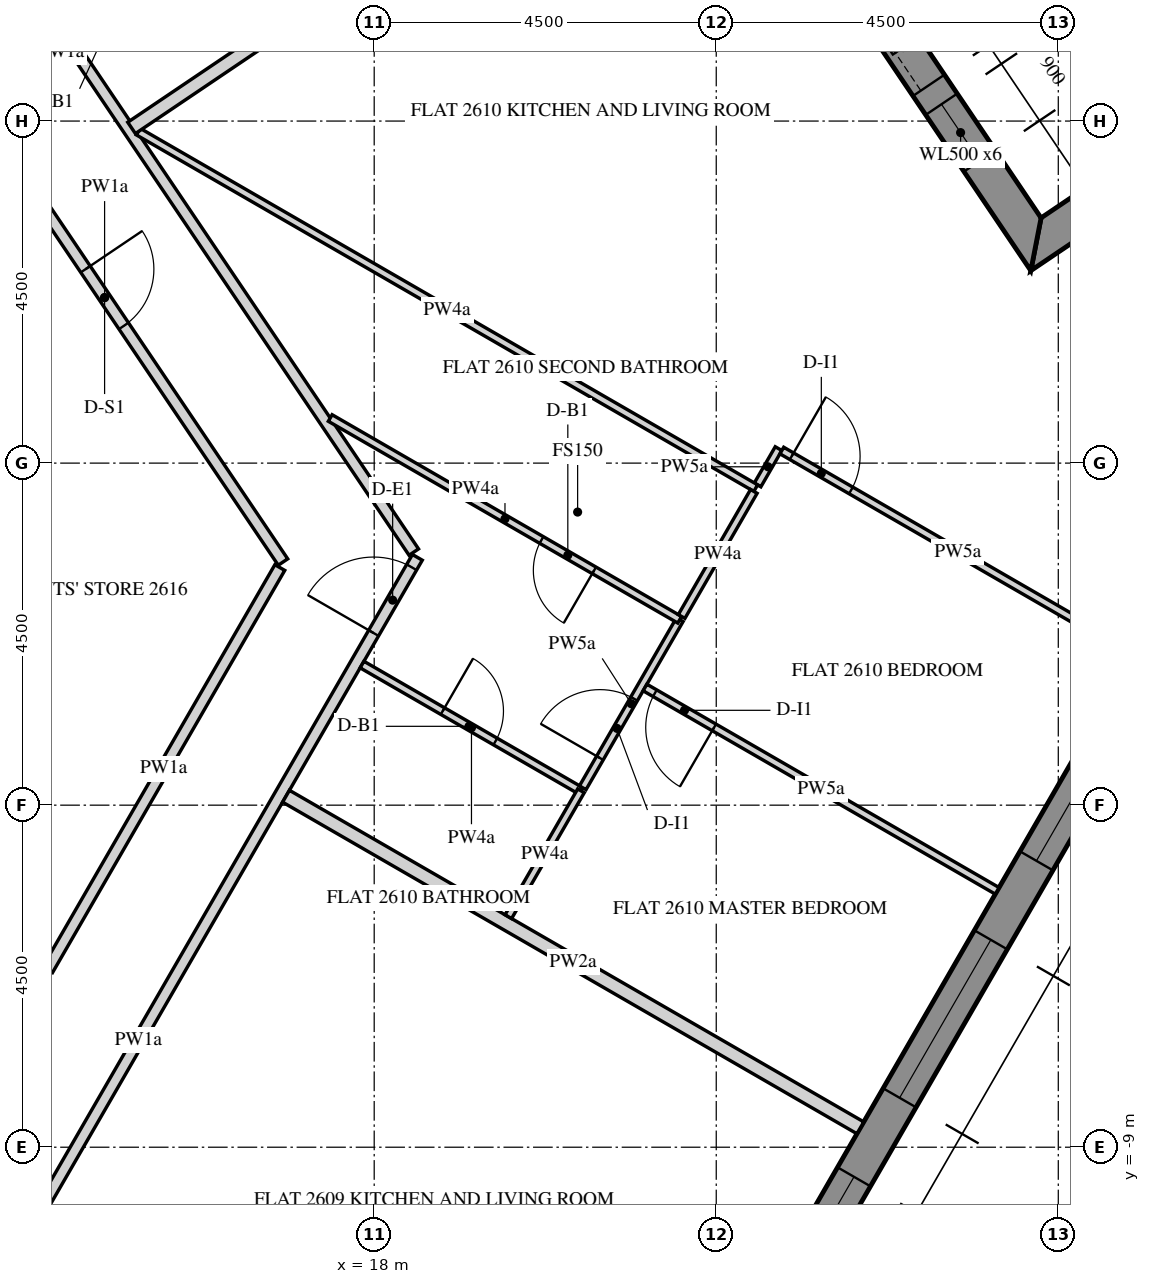
"""IFC4 building model, lengths in metres.
Left out: names, types, materials, properties, quantities, classifications, styles, units other than length and angle.
Written with IfcOpenShell. Run it as: python <this file> out.ifc"""

import sys

from ifc_helpers import new_model, si_unit, direction, frame, frame_2d, origin, place, context, subcontext, project, spatial, polyline, rectangle, outline, extrude, element, fill, save


model = new_model("IFC4")
c1 = context("Model", 3, precision=1e-05, world=origin(), true_north=direction((0.0, 1.0)))
c2 = subcontext(c1, "Body", "Model", "MODEL_VIEW")
j1 = project(units=[si_unit("LENGTHUNIT", "METRE"), si_unit("PLANEANGLEUNIT", "RADIAN")], contexts=[c1])
p1 = place(None, origin())
s1 = spatial("IfcSite", under=j1, at=p1, CompositionType="ELEMENT")
p2 = place(p1, origin())
s2 = spatial("IfcBuilding", under=s1, at=p2, CompositionType="ELEMENT")
p3 = place(p2, frame((0.0, 0.0, 334.2)))
s3 = spatial("IfcBuildingStorey", under=s2, at=p3, CompositionType="ELEMENT", Elevation=334.2)
p4 = place(p3, frame((16.451, -23.005, -0.15), z_axis=(0.0, 0.0, 1.0), x_axis=(0.500003737743, 0.866023245787, 0.0)))
e1 = element("IfcWall", 1, at=p4, inside=s3, PredefinedType="SOLIDWALL", context=c2, shape_type="SweptSolid", body=[
    extrude(outline(polyline([(-0.021, -0.25), (25.468, -0.25), (25.421, 0.25), (0.021, 0.25), (-0.021, -0.25)])), origin(), (0.0, 0.0, 1.0), 3.75),
])
p5 = place(p4, frame((2.522, 0.0, 0.75)))
e2 = element("IfcOpeningElement", 2, at=p5, cuts=e1, PredefinedType="OPENING", context=c2, shape_type="SweptSolid", body=[
    extrude(rectangle(XDim=2.4, YDim=2.7, at=frame_2d((1.2, 1.35))), frame((0.0, 0.26, 0.0), z_axis=(0.0, -1.0, 0.0), x_axis=(1.0, 0.0, 0.0)), (0.0, 0.0, 1.0), 0.52),
])
p6 = place(p4, frame((6.122, 0.0, 0.75)))
e3 = element("IfcOpeningElement", 3, at=p6, cuts=e1, PredefinedType="OPENING", context=c2, shape_type="SweptSolid", body=[
    extrude(rectangle(XDim=2.4, YDim=2.7, at=frame_2d((1.2, 1.35))), frame((0.0, 0.26, 0.0), z_axis=(0.0, -1.0, 0.0), x_axis=(1.0, 0.0, 0.0)), (0.0, 0.0, 1.0), 0.52),
])
p7 = place(p4, frame((9.722, 0.0, 0.75)))
e4 = element("IfcOpeningElement", 4, at=p7, cuts=e1, PredefinedType="OPENING", context=c2, shape_type="SweptSolid", body=[
    extrude(rectangle(XDim=2.4, YDim=2.7, at=frame_2d((1.2, 1.35))), frame((0.0, 0.26, 0.0), z_axis=(0.0, -1.0, 0.0), x_axis=(1.0, 0.0, 0.0)), (0.0, 0.0, 1.0), 0.52),
])
p8 = place(p4, frame((13.323, 0.0, 0.75)))
e5 = element("IfcOpeningElement", 5, at=p8, cuts=e1, PredefinedType="OPENING", context=c2, shape_type="SweptSolid", body=[
    extrude(rectangle(XDim=2.4, YDim=2.7, at=frame_2d((1.2, 1.35))), frame((0.0, 0.26, 0.0), z_axis=(0.0, -1.0, 0.0), x_axis=(1.0, 0.0, 0.0)), (0.0, 0.0, 1.0), 0.52),
])
p9 = place(p4, frame((16.922, 0.0, 0.75)))
e6 = element("IfcOpeningElement", 6, at=p9, cuts=e1, PredefinedType="OPENING", context=c2, shape_type="SweptSolid", body=[
    extrude(rectangle(XDim=2.4, YDim=2.7, at=frame_2d((1.2, 1.35))), frame((0.0, 0.26, 0.0), z_axis=(0.0, -1.0, 0.0), x_axis=(1.0, 0.0, 0.0)), (0.0, 0.0, 1.0), 0.52),
])
p10 = place(p4, frame((20.522, 0.0, 0.75)))
e7 = element("IfcOpeningElement", 7, at=p10, cuts=e1, PredefinedType="OPENING", context=c2, shape_type="SweptSolid", body=[
    extrude(rectangle(XDim=2.4, YDim=2.7, at=frame_2d((1.2, 1.35))), frame((0.0, 0.26, 0.0), z_axis=(0.0, -1.0, 0.0), x_axis=(1.0, 0.0, 0.0)), (0.0, 0.0, 1.0), 0.52),
])
p11 = place(p3, frame((28.364, 3.997, -0.15), z_axis=(0.0, 0.0, 1.0), x_axis=(-0.829108975345, -0.5590870299, 0.0)))
e8 = element("IfcWall", 8, at=p11, inside=s3, PredefinedType="SOLIDWALL", context=c2, shape_type="SweptSolid", body=[
    extrude(outline(polyline([(-0.25, -0.25), (1.75, -0.25), (2.25, 0.25), (0.25, 0.25), (-0.25, -0.25)])), origin(), (0.0, 0.0, 1.0), 3.75),
])
p12 = place(p3, frame((26.706, 2.879, -0.15), z_axis=(0.0, 0.0, 1.0), x_axis=(-0.559197891507, 0.829034208061, 0.0)))
e9 = element("IfcWall", 9, at=p12, inside=s3, PredefinedType="SOLIDWALL", context=c2, shape_type="SweptSolid", body=[
    extrude(outline(polyline([(0.25, -0.25), (22.795, -0.25), (23.295, 0.25), (-0.25, 0.25), (0.25, -0.25)])), origin(), (0.0, 0.0, 1.0), 3.75),
])
p13 = place(p12, frame((1.323, 0.0, 1.05)))
e10 = element("IfcOpeningElement", 10, at=p13, cuts=e9, PredefinedType="OPENING", context=c2, shape_type="SweptSolid", body=[
    extrude(rectangle(XDim=0.9, YDim=1.5, at=frame_2d((0.45, 0.75))), frame((0.0, 0.26, 0.0), z_axis=(0.0, -1.0, 0.0), x_axis=(1.0, 0.0, 0.0)), (0.0, 0.0, 1.0), 0.52),
])
p14 = place(p12, frame((2.522, 0.0, 0.15)))
e11 = element("IfcOpeningElement", 11, at=p14, cuts=e9, PredefinedType="OPENING", context=c2, shape_type="SweptSolid", body=[
    extrude(rectangle(XDim=1.2, YDim=2.4, at=frame_2d((0.6, 1.2))), frame((0.0, 0.26, 0.0), z_axis=(0.0, -1.0, 0.0), x_axis=(1.0, 0.0, 0.0)), (0.0, 0.0, 1.0), 0.52),
])
p15 = place(p12, frame((4.922, 0.0, 1.05)))
e12 = element("IfcOpeningElement", 12, at=p15, cuts=e9, PredefinedType="OPENING", context=c2, shape_type="SweptSolid", body=[
    extrude(rectangle(XDim=0.9, YDim=1.5, at=frame_2d((0.45, 0.75))), frame((0.0, 0.26, 0.0), z_axis=(0.0, -1.0, 0.0), x_axis=(1.0, 0.0, 0.0)), (0.0, 0.0, 1.0), 0.52),
])
p16 = place(p12, frame((6.122, 0.0, 0.15)))
e13 = element("IfcOpeningElement", 13, at=p16, cuts=e9, PredefinedType="OPENING", context=c2, shape_type="SweptSolid", body=[
    extrude(rectangle(XDim=1.2, YDim=2.4, at=frame_2d((0.6, 1.2))), frame((0.0, 0.26, 0.0), z_axis=(0.0, -1.0, 0.0), x_axis=(1.0, 0.0, 0.0)), (0.0, 0.0, 1.0), 0.52),
])
p17 = place(p12, frame((8.522, 0.0, 1.05)))
e14 = element("IfcOpeningElement", 14, at=p17, cuts=e9, PredefinedType="OPENING", context=c2, shape_type="SweptSolid", body=[
    extrude(rectangle(XDim=0.9, YDim=1.5, at=frame_2d((0.45, 0.75))), frame((0.0, 0.26, 0.0), z_axis=(0.0, -1.0, 0.0), x_axis=(1.0, 0.0, 0.0)), (0.0, 0.0, 1.0), 0.52),
])
p18 = place(p12, frame((9.722, 0.0, 0.15)))
e15 = element("IfcOpeningElement", 15, at=p18, cuts=e9, PredefinedType="OPENING", context=c2, shape_type="SweptSolid", body=[
    extrude(rectangle(XDim=1.2, YDim=2.4, at=frame_2d((0.6, 1.2))), frame((0.0, 0.26, 0.0), z_axis=(0.0, -1.0, 0.0), x_axis=(1.0, 0.0, 0.0)), (0.0, 0.0, 1.0), 0.52),
])
p19 = place(p12, frame((12.122, 0.0, 1.05)))
e16 = element("IfcOpeningElement", 16, at=p19, cuts=e9, PredefinedType="OPENING", context=c2, shape_type="SweptSolid", body=[
    extrude(rectangle(XDim=0.9, YDim=1.5, at=frame_2d((0.45, 0.75))), frame((0.0, 0.26, 0.0), z_axis=(0.0, -1.0, 0.0), x_axis=(1.0, 0.0, 0.0)), (0.0, 0.0, 1.0), 0.52),
])
p20 = place(p12, frame((13.323, 0.0, 0.15)))
e17 = element("IfcOpeningElement", 17, at=p20, cuts=e9, PredefinedType="OPENING", context=c2, shape_type="SweptSolid", body=[
    extrude(rectangle(XDim=1.2, YDim=2.4, at=frame_2d((0.6, 1.2))), frame((0.0, 0.26, 0.0), z_axis=(0.0, -1.0, 0.0), x_axis=(1.0, 0.0, 0.0)), (0.0, 0.0, 1.0), 0.52),
])
p21 = place(p12, frame((15.722, 0.0, 1.05)))
e18 = element("IfcOpeningElement", 18, at=p21, cuts=e9, PredefinedType="OPENING", context=c2, shape_type="SweptSolid", body=[
    extrude(rectangle(XDim=0.9, YDim=1.5, at=frame_2d((0.45, 0.75))), frame((0.0, 0.26, 0.0), z_axis=(0.0, -1.0, 0.0), x_axis=(1.0, 0.0, 0.0)), (0.0, 0.0, 1.0), 0.52),
])
p22 = place(p12, frame((16.922, 0.0, 0.15)))
e19 = element("IfcOpeningElement", 19, at=p22, cuts=e9, PredefinedType="OPENING", context=c2, shape_type="SweptSolid", body=[
    extrude(rectangle(XDim=1.2, YDim=2.4, at=frame_2d((0.6, 1.2))), frame((0.0, 0.26, 0.0), z_axis=(0.0, -1.0, 0.0), x_axis=(1.0, 0.0, 0.0)), (0.0, 0.0, 1.0), 0.52),
])
p23 = place(p12, frame((19.323, 0.0, 1.05)))
e20 = element("IfcOpeningElement", 20, at=p23, cuts=e9, PredefinedType="OPENING", context=c2, shape_type="SweptSolid", body=[
    extrude(rectangle(XDim=0.9, YDim=1.5, at=frame_2d((0.45, 0.75))), frame((0.0, 0.26, 0.0), z_axis=(0.0, -1.0, 0.0), x_axis=(1.0, 0.0, 0.0)), (0.0, 0.0, 1.0), 0.52),
])
p24 = place(p12, frame((20.522, 0.0, 0.15)))
e21 = element("IfcOpeningElement", 21, at=p24, cuts=e9, PredefinedType="OPENING", context=c2, shape_type="SweptSolid", body=[
    extrude(rectangle(XDim=1.2, YDim=2.4, at=frame_2d((0.6, 1.2))), frame((0.0, 0.26, 0.0), z_axis=(0.0, -1.0, 0.0), x_axis=(1.0, 0.0, 0.0)), (0.0, 0.0, 1.0), 0.52),
])
p25 = place(p3, frame((11.229, -13.951, 0.0), z_axis=(0.0, 0.0, 1.0), x_axis=(0.499997948852, 0.866026588012, 0.0)))
e22 = element("IfcWall", 22, at=p25, inside=s3, PredefinedType="PARTITIONING", context=c2, shape_type="SweptSolid", body=[
    extrude(rectangle(XDim=14.677, YDim=0.15, at=frame_2d((7.339, 0.0))), origin(), (0.0, 0.0, 1.0), 2.838),
])
p26 = place(p25, frame((0.4, 0.0, 0.0)))
e23 = element("IfcOpeningElement", 23, at=p26, cuts=e22, PredefinedType="OPENING", context=c2, shape_type="SweptSolid", body=[
    extrude(rectangle(XDim=1.0, YDim=2.1, at=frame_2d((0.5, 1.05))), frame((0.0, 0.085, 0.0), z_axis=(0.0, -1.0, 0.0), x_axis=(1.0, 0.0, 0.0)), (0.0, 0.0, 1.0), 0.17),
])
p27 = place(p25, frame((13.527, 0.0, 0.0)))
e24 = element("IfcOpeningElement", 24, at=p27, cuts=e22, PredefinedType="OPENING", context=c2, shape_type="SweptSolid", body=[
    extrude(rectangle(XDim=1.0, YDim=2.1, at=frame_2d((0.5, 1.05))), frame((0.0, 0.085, 0.0), z_axis=(0.0, -1.0, 0.0), x_axis=(1.0, 0.0, 0.0)), (0.0, 0.0, 1.0), 0.17),
])
p28 = place(p3, frame((18.521, -1.171, 0.0), z_axis=(0.0, 0.0, 1.0), x_axis=(-0.559191021435, 0.829038842001, 0.0)))
e25 = element("IfcWall", 25, at=p28, inside=s3, PredefinedType="PARTITIONING", context=c2, shape_type="SweptSolid", body=[
    extrude(rectangle(XDim=16.605, YDim=0.15, at=frame_2d((8.303, 0.0))), origin(), (0.0, 0.0, 1.0), 2.838),
])
p29 = place(p28, frame((9.703, 0.0, 0.0)))
e26 = element("IfcOpeningElement", 26, at=p29, cuts=e25, PredefinedType="OPENING", context=c2, shape_type="SweptSolid", body=[
    extrude(rectangle(XDim=1.0, YDim=2.1, at=frame_2d((0.5, 1.05))), frame((0.0, 0.085, 0.0), z_axis=(0.0, -1.0, 0.0), x_axis=(1.0, 0.0, 0.0)), (0.0, 0.0, 1.0), 0.17),
])
p30 = place(p3, frame((12.106, 5.657, 0.0), z_axis=(0.0, 0.0, 1.0), x_axis=(0.559202573837, -0.829031049728, 0.0)))
e27 = element("IfcWall", 27, at=p30, inside=s3, PredefinedType="PARTITIONING", context=c2, shape_type="SweptSolid", body=[
    extrude(rectangle(XDim=8.394, YDim=0.15, at=frame_2d((4.197, 0.0))), origin(), (0.0, 0.0, 1.0), 2.838),
])
p31 = place(p30, frame((3.747, 0.0, 0.0)))
e28 = element("IfcOpeningElement", 28, at=p31, cuts=e27, PredefinedType="OPENING", context=c2, shape_type="SweptSolid", body=[
    extrude(rectangle(XDim=0.9, YDim=2.1, at=frame_2d((0.45, 1.05))), frame((0.0, 0.085, 0.0), z_axis=(0.0, -1.0, 0.0), x_axis=(1.0, 0.0, 0.0)), (0.0, 0.0, 1.0), 0.17),
])
p32 = place(p3, frame((16.758, -1.374, 0.0), z_axis=(0.0, 0.0, 1.0), x_axis=(-0.499980689202, -0.866036552592, 0.0)))
e29 = element("IfcWall", 29, at=p32, inside=s3, PredefinedType="PARTITIONING", context=c2, shape_type="SweptSolid", body=[
    extrude(rectangle(XDim=6.111, YDim=0.15, at=frame_2d((3.055, 0.0))), origin(), (0.0, 0.0, 1.0), 2.838),
])
p33 = place(p3, frame((24.396, -8.745, 0.0), z_axis=(0.0, 0.0, 1.0), x_axis=(-0.866018297078, 0.500012308975, 0.0)))
e30 = element("IfcWall", 30, at=p33, inside=s3, PredefinedType="PARTITIONING", context=c2, shape_type="SweptSolid", body=[
    extrude(rectangle(XDim=8.725, YDim=0.18, at=frame_2d((4.362, 0.0))), origin(), (0.0, 0.0, 1.0), 2.838),
])
p34 = place(p3, frame((23.043, -0.287, 0.0), z_axis=(0.0, 0.0, 1.0), x_axis=(0.500181810019, 0.865920410272, 0.0)))
e31 = element("IfcWall", 31, at=p34, inside=s3, PredefinedType="PARTITIONING", context=c2, shape_type="SweptSolid", body=[
    extrude(rectangle(XDim=0.552, YDim=0.1, at=frame_2d((0.276, 0.0))), origin(), (0.0, 0.0, 1.0), 2.838),
])
p35 = place(p3, frame((23.363, 0.166, 0.0), z_axis=(0.0, 0.0, 1.0), x_axis=(0.866024483152, -0.500001594578, 0.0)))
e32 = element("IfcWall", 32, at=p35, inside=s3, PredefinedType="PARTITIONING", context=c2, shape_type="SweptSolid", body=[
    extrude(rectangle(XDim=5.35, YDim=0.1, at=frame_2d((2.675, 0.0))), origin(), (0.0, 0.0, 1.0), 2.838),
])
p36 = place(p35, frame((0.15, 0.0, 0.0)))
e33 = element("IfcOpeningElement", 33, at=p36, cuts=e32, PredefinedType="OPENING", context=c2, shape_type="SweptSolid", body=[
    extrude(rectangle(XDim=0.9, YDim=2.1, at=frame_2d((0.45, 1.05))), frame((0.0, 0.06, 0.0), z_axis=(0.0, -1.0, 0.0), x_axis=(1.0, 0.0, 0.0)), (0.0, 0.0, 1.0), 0.12),
])
p37 = place(p3, frame((14.896, 4.361, 0.0), z_axis=(0.0, 0.0, 1.0), x_axis=(0.866020874699, -0.500007844523, 0.0)))
e34 = element("IfcWall", 34, at=p37, inside=s3, PredefinedType="PARTITIONING", context=c2, shape_type="SweptSolid", body=[
    extrude(rectangle(XDim=9.38, YDim=0.1, at=frame_2d((4.69, 0.0))), origin(), (0.0, 0.0, 1.0), 2.838),
])
p38 = place(p3, frame((22.069, 9.307, 0.0), z_axis=(0.0, 0.0, 1.0), x_axis=(-0.829040270775, -0.559188903174, 0.0)))
e35 = element("IfcWall", 35, at=p38, inside=s3, PredefinedType="PARTITIONING", context=c2, shape_type="SweptSolid", body=[
    extrude(rectangle(XDim=8.758, YDim=0.18, at=frame_2d((4.379, 0.0))), origin(), (0.0, 0.0, 1.0), 2.838),
])
p39 = place(p3, frame((17.84, -2.65, 0.0), z_axis=(0.0, 0.0, 1.0), x_axis=(0.866002163101, -0.500040251884, 0.0)))
e36 = element("IfcWall", 36, at=p39, inside=s3, PredefinedType="PARTITIONING", context=c2, shape_type="SweptSolid", body=[
    extrude(rectangle(XDim=3.325, YDim=0.1, at=frame_2d((1.663, 0.0))), origin(), (0.0, 0.0, 1.0), 2.838),
])
p40 = place(p39, frame((1.225, 0.0, 0.0)))
e37 = element("IfcOpeningElement", 37, at=p40, cuts=e36, PredefinedType="OPENING", context=c2, shape_type="SweptSolid", body=[
    extrude(rectangle(XDim=0.8, YDim=2.1, at=frame_2d((0.4, 1.05))), frame((0.0, 0.06, 0.0), z_axis=(0.0, -1.0, 0.0), x_axis=(1.0, 0.0, 0.0)), (0.0, 0.0, 1.0), 0.12),
])
p41 = place(p3, frame((20.743, -4.271, 0.0), z_axis=(0.0, 0.0, 1.0), x_axis=(0.500014808323, 0.866016854026, 0.0)))
e38 = element("IfcWall", 38, at=p41, inside=s3, PredefinedType="PARTITIONING", context=c2, shape_type="SweptSolid", body=[
    extrude(rectangle(XDim=2.554, YDim=0.1, at=frame_2d((1.277, 0.0))), origin(), (0.0, 0.0, 1.0), 2.838),
])
p42 = place(p41, frame((0.452, 0.0, 0.0)))
e39 = element("IfcOpeningElement", 39, at=p42, cuts=e38, PredefinedType="OPENING", context=c2, shape_type="SweptSolid", body=[
    extrude(rectangle(XDim=0.9, YDim=2.1, at=frame_2d((0.45, 1.05))), frame((0.0, 0.06, 0.0), z_axis=(0.0, -1.0, 0.0), x_axis=(1.0, 0.0, 0.0)), (0.0, 0.0, 1.0), 0.12),
])
p43 = place(p3, frame((22.02, -2.061, 0.0), z_axis=(0.0, 0.0, 1.0), x_axis=(-0.866041630335, 0.499971893737, 0.0)))
e40 = element("IfcWall", 40, at=p43, inside=s3, PredefinedType="PARTITIONING", context=c2, shape_type="SweptSolid", body=[
    extrude(rectangle(XDim=5.309, YDim=0.1, at=frame_2d((2.655, 0.0))), origin(), (0.0, 0.0, 1.0), 2.838),
])
p44 = place(p43, frame((1.3, 0.0, 0.0)))
e41 = element("IfcOpeningElement", 41, at=p44, cuts=e40, PredefinedType="OPENING", context=c2, shape_type="SweptSolid", body=[
    extrude(rectangle(XDim=0.8, YDim=2.1, at=frame_2d((0.4, 1.05))), frame((0.0, 0.06, 0.0), z_axis=(0.0, -1.0, 0.0), x_axis=(1.0, 0.0, 0.0)), (0.0, 0.0, 1.0), 0.12),
])
p45 = place(p3, frame((19.764, -5.967, 0.0), z_axis=(0.0, 0.0, 1.0), x_axis=(0.500039310002, 0.866002706955, 0.0)))
e42 = element("IfcWall", 42, at=p45, inside=s3, PredefinedType="PARTITIONING", context=c2, shape_type="SweptSolid", body=[
    extrude(rectangle(XDim=1.912, YDim=0.1, at=frame_2d((0.956, 0.0))), origin(), (0.0, 0.0, 1.0), 2.838),
])
p46 = place(p3, frame((26.196, -5.627, 0.0), z_axis=(0.0, 0.0, 1.0), x_axis=(-0.866024483152, 0.500001594578, 0.0)))
e43 = element("IfcWall", 43, at=p46, inside=s3, PredefinedType="PARTITIONING", context=c2, shape_type="SweptSolid", body=[
    extrude(rectangle(XDim=5.35, YDim=0.1, at=frame_2d((2.675, 0.0))), origin(), (0.0, 0.0, 1.0), 2.838),
])
p47 = place(p46, frame((4.3, 0.0, 0.0)))
e44 = element("IfcOpeningElement", 44, at=p47, cuts=e43, PredefinedType="OPENING", context=c2, shape_type="SweptSolid", body=[
    extrude(rectangle(XDim=0.9, YDim=2.1, at=frame_2d((0.45, 1.05))), frame((0.0, 0.06, 0.0), z_axis=(0.0, -1.0, 0.0), x_axis=(1.0, 0.0, 0.0)), (0.0, 0.0, 1.0), 0.12),
])
p48 = place(p3, frame((22.995, -0.372, 0.0), z_axis=(0.0, 0.0, 1.0), x_axis=(-0.500063520245, -0.865988727248, 0.0)))
e45 = element("IfcWall", 45, at=p48, inside=s3, PredefinedType="PARTITIONING", context=c2, shape_type="SweptSolid", body=[
    extrude(rectangle(XDim=1.9, YDim=0.1, at=frame_2d((0.95, 0.0))), origin(), (0.0, 0.0, 1.0), 2.838),
])
p49 = place(p8, frame((0.0, 0.18, 0.0)))
e46 = element("IfcWindow", 46, at=p49, inside=s3, PartitioningType="DOUBLE_PANEL_VERTICAL", PredefinedType="WINDOW", context=c2, shape_type="SweptSolid", body=[
    extrude(rectangle(XDim=2.4, YDim=2.7, at=frame_2d((1.2, 1.35))), frame((0.0, 0.03, 0.0), z_axis=(0.0, -1.0, 0.0), x_axis=(1.0, 0.0, 0.0)), (0.0, 0.0, 1.0), 0.06),
])
fill(e5, e46)
p50 = place(p9, frame((0.0, 0.18, 0.0)))
e47 = element("IfcWindow", 47, at=p50, inside=s3, PartitioningType="DOUBLE_PANEL_VERTICAL", PredefinedType="WINDOW", context=c2, shape_type="SweptSolid", body=[
    extrude(rectangle(XDim=2.4, YDim=2.7, at=frame_2d((1.2, 1.35))), frame((0.0, 0.03, 0.0), z_axis=(0.0, -1.0, 0.0), x_axis=(1.0, 0.0, 0.0)), (0.0, 0.0, 1.0), 0.06),
])
fill(e6, e47)
p51 = place(p10, frame((0.0, 0.18, 0.0)))
e48 = element("IfcWindow", 48, at=p51, inside=s3, PartitioningType="DOUBLE_PANEL_VERTICAL", PredefinedType="WINDOW", context=c2, shape_type="SweptSolid", body=[
    extrude(rectangle(XDim=2.4, YDim=2.7, at=frame_2d((1.2, 1.35))), frame((0.0, 0.03, 0.0), z_axis=(0.0, -1.0, 0.0), x_axis=(1.0, 0.0, 0.0)), (0.0, 0.0, 1.0), 0.06),
])
fill(e7, e48)
p52 = place(p13, frame((0.0, 0.18, 0.0)))
e49 = element("IfcWindow", 49, at=p52, inside=s3, PartitioningType="SINGLE_PANEL", PredefinedType="WINDOW", context=c2, shape_type="SweptSolid", body=[
    extrude(rectangle(XDim=0.9, YDim=1.5, at=frame_2d((0.45, 0.75))), frame((0.0, 0.03, 0.0), z_axis=(0.0, -1.0, 0.0), x_axis=(1.0, 0.0, 0.0)), (0.0, 0.0, 1.0), 0.06),
])
fill(e10, e49)
p53 = place(p14, frame((0.0, 0.175, 0.0)))
e50 = element("IfcDoor", 50, at=p53, inside=s3, OperationType="SLIDING_TO_LEFT", PredefinedType="DOOR", context=c2, shape_type="SweptSolid", body=[
    extrude(rectangle(XDim=1.2, YDim=2.4, at=frame_2d((0.6, 1.2))), frame((0.0, 0.025, 0.0), z_axis=(0.0, -1.0, 0.0), x_axis=(1.0, 0.0, 0.0)), (0.0, 0.0, 1.0), 0.05),
])
fill(e11, e50)
p54 = place(p27, origin())
e51 = element("IfcDoor", 51, at=p54, inside=s3, OperationType="SINGLE_SWING_LEFT", PredefinedType="DOOR", context=c2, shape_type="SweptSolid", body=[
    extrude(rectangle(XDim=1.0, YDim=2.1, at=frame_2d((0.5, 1.05))), frame((0.0, 0.025, 0.0), z_axis=(0.0, -1.0, 0.0), x_axis=(1.0, 0.0, 0.0)), (0.0, 0.0, 1.0), 0.05),
])
fill(e24, e51)
p55 = place(p40, origin())
e52 = element("IfcDoor", 52, at=p55, inside=s3, OperationType="SINGLE_SWING_RIGHT", PredefinedType="DOOR", context=c2, shape_type="SweptSolid", body=[
    extrude(rectangle(XDim=0.8, YDim=2.1, at=frame_2d((0.4, 1.05))), frame((0.0, 0.025, 0.0), z_axis=(0.0, -1.0, 0.0), x_axis=(1.0, 0.0, 0.0)), (0.0, 0.0, 1.0), 0.05),
])
fill(e37, e52)
p56 = place(p42, origin())
e53 = element("IfcDoor", 53, at=p56, inside=s3, OperationType="SINGLE_SWING_LEFT", PredefinedType="DOOR", context=c2, shape_type="SweptSolid", body=[
    extrude(rectangle(XDim=0.9, YDim=2.1, at=frame_2d((0.45, 1.05))), frame((0.0, 0.025, 0.0), z_axis=(0.0, -1.0, 0.0), x_axis=(1.0, 0.0, 0.0)), (0.0, 0.0, 1.0), 0.05),
])
fill(e39, e53)
p57 = place(p47, origin())
e54 = element("IfcDoor", 54, at=p57, inside=s3, OperationType="SINGLE_SWING_RIGHT", PredefinedType="DOOR", context=c2, shape_type="SweptSolid", body=[
    extrude(rectangle(XDim=0.9, YDim=2.1, at=frame_2d((0.45, 1.05))), frame((0.0, 0.025, 0.0), z_axis=(0.0, -1.0, 0.0), x_axis=(1.0, 0.0, 0.0)), (0.0, 0.0, 1.0), 0.05),
])
fill(e44, e54)
p58 = place(p36, origin())
e55 = element("IfcDoor", 55, at=p58, inside=s3, OperationType="SINGLE_SWING_RIGHT", PredefinedType="DOOR", context=c2, shape_type="SweptSolid", body=[
    extrude(rectangle(XDim=0.9, YDim=2.1, at=frame_2d((0.45, 1.05))), frame((0.0, 0.025, 0.0), z_axis=(0.0, -1.0, 0.0), x_axis=(1.0, 0.0, 0.0)), (0.0, 0.0, 1.0), 0.05),
])
fill(e33, e55)
p59 = place(p44, origin())
e56 = element("IfcDoor", 56, at=p59, inside=s3, OperationType="SINGLE_SWING_RIGHT", PredefinedType="DOOR", context=c2, shape_type="SweptSolid", body=[
    extrude(rectangle(XDim=0.8, YDim=2.1, at=frame_2d((0.4, 1.05))), frame((0.0, 0.025, 0.0), z_axis=(0.0, -1.0, 0.0), x_axis=(1.0, 0.0, 0.0)), (0.0, 0.0, 1.0), 0.05),
])
fill(e41, e56)
p60 = place(p31, origin())
e57 = element("IfcDoor", 57, at=p60, inside=s3, OperationType="SINGLE_SWING_RIGHT", PredefinedType="DOOR", context=c2, shape_type="SweptSolid", body=[
    extrude(rectangle(XDim=0.9, YDim=2.1, at=frame_2d((0.45, 1.05))), frame((0.0, 0.025, 0.0), z_axis=(0.0, -1.0, 0.0), x_axis=(1.0, 0.0, 0.0)), (0.0, 0.0, 1.0), 0.05),
])
fill(e28, e57)
save(model, sys.argv[1])
